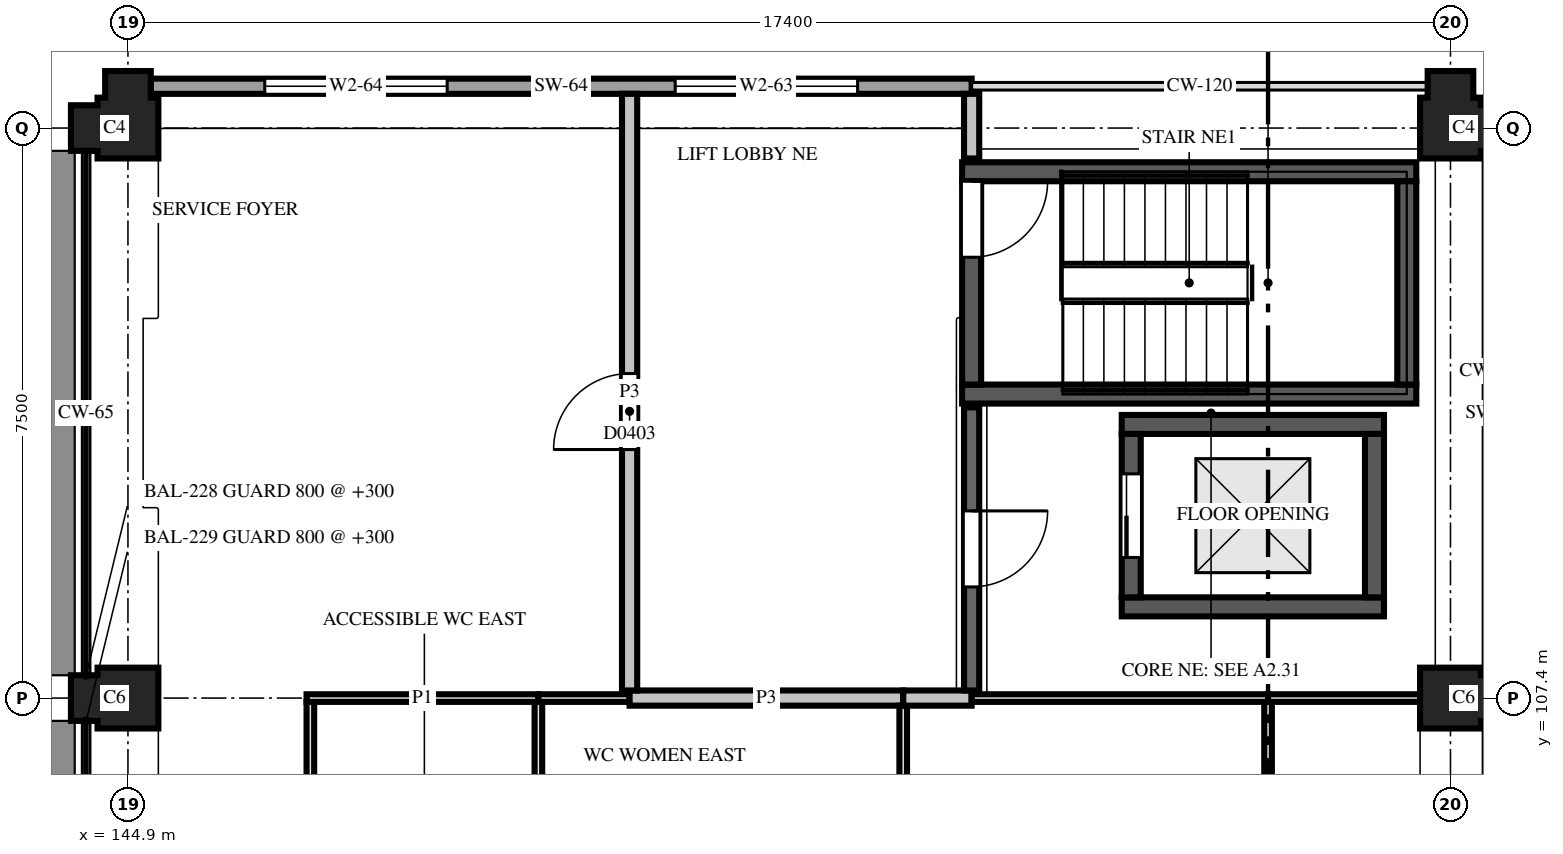
"""IFC4 building model, lengths in metres.
Left out: names, types, materials, properties, quantities, classifications, styles, units other than length and angle.
Written with IfcOpenShell. Run it as: python <this file> out.ifc"""

import sys

from ifc_helpers import new_model, si_unit, direction, frame, frame_2d, origin, place, context, subcontext, project, spatial, polyline, rectangle, outline, extrude, element, fill, save


model = new_model("IFC4")
c1 = context("Model", 3, precision=1e-05, world=origin(), true_north=direction((0.0, 1.0)))
c2 = subcontext(c1, "Body", "Model", "MODEL_VIEW")
j1 = project(units=[si_unit("LENGTHUNIT", "METRE"), si_unit("PLANEANGLEUNIT", "RADIAN")], contexts=[c1])
p1 = place(None, origin())
s1 = spatial("IfcSite", under=j1, at=p1, CompositionType="ELEMENT")
p2 = place(p1, origin())
s2 = spatial("IfcBuilding", under=s1, at=p2, CompositionType="ELEMENT")
p3 = place(p2, frame((0.0, 0.0, 15.6)))
s3 = spatial("IfcBuildingStorey", under=s2, at=p3, CompositionType="ELEMENT", Elevation=15.6)
for number, where, z_axis, x_axis in (
    (1, (144.9, 107.4, 0.0), (0.0, 0.0, 1.0), (-1.0, 0.0, 0.0)),
    (2, (162.3, 107.4, 0.0), (0.0, 0.0, 1.0), (1.0, 0.0, 0.0)),
):
    element("IfcColumn", number, at=place(p3, frame(where, z_axis=z_axis, x_axis=x_axis)), inside=s3, PredefinedType="COLUMN", context=c2, shape_type="SweptSolid", body=[
        extrude(outline(polyline([(-0.4, -0.4), (0.4, -0.4), (0.4, -0.3), (0.75, -0.3), (0.75, 0.3), (0.4, 0.3), (0.4, 0.4), (-0.4, 0.4), (-0.4, -0.4)])), origin(), (0.0, 0.0, 1.0), 3.7),
    ])
for number, where, z_axis, x_axis in (
    (3, (144.9, 114.9, 0.0), (0.0, 0.0, 1.0), (0.0, 1.0, 0.0)),
    (4, (162.3, 114.9, 0.0), (0.0, 0.0, 1.0), (1.0, 0.0, 0.0)),
):
    element("IfcColumn", number, at=place(p3, frame(where, z_axis=z_axis, x_axis=x_axis)), inside=s3, PredefinedType="COLUMN", context=c2, shape_type="SweptSolid", body=[
        extrude(outline(polyline([(-0.4, -0.4), (0.4, -0.4), (0.4, -0.3), (0.75, -0.3), (0.75, 0.3), (0.4, 0.3), (0.4, 0.4), (0.3, 0.4), (0.3, 0.75), (-0.3, 0.75), (-0.3, 0.4), (-0.4, 0.4), (-0.4, -0.4)])), origin(), (0.0, 0.0, 1.0), 3.7),
    ])
for number, where, z_axis, x_axis in (
    (5, (157.975, 108.6, 0.0), (0.0, 0.0, 1.0), (1.0, 0.0, 0.0)),
    (6, (157.975, 111.0, 0.0), (0.0, 0.0, 1.0), (1.0, 0.0, 0.0)),
):
    element("IfcWall", number, at=place(p3, frame(where, z_axis=z_axis, x_axis=x_axis)), inside=s3, PredefinedType="SHEAR", context=c2, shape_type="SweptSolid", body=[
        extrude(rectangle(XDim=3.45, YDim=0.25, at=frame_2d((1.725, 0.0))), origin(), (0.0, 0.0, 1.0), 3.7),
    ])
for number, where, z_axis, x_axis in (
    (7, (155.875, 111.4, 0.0), (0.0, 0.0, 1.0), (1.0, 0.0, 0.0)),
    (8, (155.875, 114.325, 0.0), (0.0, 0.0, 1.0), (1.0, 0.0, 0.0)),
):
    element("IfcWall", number, at=place(p3, frame(where, z_axis=z_axis, x_axis=x_axis)), inside=s3, PredefinedType="SHEAR", context=c2, shape_type="SweptSolid", body=[
        extrude(rectangle(XDim=5.975, YDim=0.25, at=frame_2d((2.988, 0.0))), origin(), (0.0, 0.0, 1.0), 3.7),
    ])
p4 = place(p3, frame((156.0, 111.525, 0.0), z_axis=(0.0, 0.0, 1.0), x_axis=(0.0, 1.0, 0.0)))
e9 = element("IfcWall", 9, at=p4, inside=s3, PredefinedType="SHEAR", context=c2, shape_type="SweptSolid", body=[
    extrude(rectangle(XDim=2.675, YDim=0.25, at=frame_2d((1.337, 0.0))), origin(), (0.0, 0.0, 1.0), 3.7),
])
p5 = place(p4, frame((1.675, 0.0, 0.0)))
e10 = element("IfcOpeningElement", 10, at=p5, cuts=e9, PredefinedType="OPENING", context=c2, shape_type="SweptSolid", body=[
    extrude(rectangle(XDim=1.0, YDim=2.1, at=frame_2d((0.5, 1.05))), frame((0.0, 0.135, 0.0), z_axis=(0.0, -1.0, 0.0), x_axis=(1.0, 0.0, 0.0)), (0.0, 0.0, 1.0), 0.27),
])
p6 = place(p3, frame((158.1, 108.725, 0.0), z_axis=(0.0, 0.0, 1.0), x_axis=(0.0, 1.0, 0.0)))
e11 = element("IfcWall", 11, at=p6, inside=s3, PredefinedType="SHEAR", context=c2, shape_type="SweptSolid", body=[
    extrude(rectangle(XDim=2.15, YDim=0.25, at=frame_2d((1.075, 0.0))), origin(), (0.0, 0.0, 1.0), 3.7),
])
p7 = place(p6, frame((0.525, 0.0, 0.0)))
e12 = element("IfcOpeningElement", 12, at=p7, cuts=e11, PredefinedType="OPENING", context=c2, shape_type="SweptSolid", body=[
    extrude(rectangle(XDim=1.1, YDim=2.1, at=frame_2d((0.55, 1.05))), frame((0.0, 0.135, 0.0), z_axis=(0.0, -1.0, 0.0), x_axis=(1.0, 0.0, 0.0)), (0.0, 0.0, 1.0), 0.27),
])
p8 = place(p3, frame((161.3, 108.725, 0.0), z_axis=(0.0, 0.0, 1.0), x_axis=(0.0, 1.0, 0.0)))
e13 = element("IfcWall", 13, at=p8, inside=s3, PredefinedType="SHEAR", context=c2, shape_type="SweptSolid", body=[
    extrude(rectangle(XDim=2.15, YDim=0.25, at=frame_2d((1.075, 0.0))), origin(), (0.0, 0.0, 1.0), 3.7),
])
p9 = place(p3, frame((161.725, 111.525, 0.0), z_axis=(0.0, 0.0, 1.0), x_axis=(0.0, 1.0, 0.0)))
e14 = element("IfcWall", 14, at=p9, inside=s3, PredefinedType="SHEAR", context=c2, shape_type="SweptSolid", body=[
    extrude(rectangle(XDim=2.675, YDim=0.25, at=frame_2d((1.337, 0.0))), origin(), (0.0, 0.0, 1.0), 3.7),
])
p10 = place(p3, frame((156.0, 115.45, 0.0), z_axis=(0.0, 0.0, 1.0), x_axis=(-1.0, 0.0, 0.0)))
e15 = element("IfcWall", 15, at=p10, inside=s3, PredefinedType="SOLIDWALL", context=c2, shape_type="SweptSolid", body=[
    extrude(rectangle(XDim=10.8, YDim=0.2, at=frame_2d((5.4, 0.0))), origin(), (0.0, 0.0, 1.0), 1.7),
])
p11 = place(p10, frame((1.5, 0.0, 0.55)))
e16 = element("IfcOpeningElement", 16, at=p11, cuts=e15, PredefinedType="OPENING", context=c2, shape_type="SweptSolid", body=[
    extrude(rectangle(XDim=2.4, YDim=1.0, at=frame_2d((1.2, 0.5))), frame((0.0, 0.11, 0.0), z_axis=(0.0, -1.0, 0.0), x_axis=(1.0, 0.0, 0.0)), (0.0, 0.0, 1.0), 0.22),
])
p12 = place(p10, frame((6.9, 0.0, 0.55)))
e17 = element("IfcOpeningElement", 17, at=p12, cuts=e15, PredefinedType="OPENING", context=c2, shape_type="SweptSolid", body=[
    extrude(rectangle(XDim=2.4, YDim=1.0, at=frame_2d((1.2, 0.5))), frame((0.0, 0.11, 0.0), z_axis=(0.0, -1.0, 0.0), x_axis=(1.0, 0.0, 0.0)), (0.0, 0.0, 1.0), 0.22),
])
for number, where, z_axis, x_axis in (
    (18, (147.3, 107.35, 0.0), (0.0, 0.0, 1.0), (0.0, -1.0, 0.0)),
    (19, (150.3, 107.35, 0.0), (0.0, 0.0, 1.0), (0.0, -1.0, 0.0)),
):
    element("IfcWall", number, at=place(p3, frame(where, z_axis=z_axis, x_axis=x_axis)), inside=s3, PredefinedType="PARTITIONING", context=c2, shape_type="SweptSolid", body=[
        extrude(rectangle(XDim=5.0, YDim=0.1, at=frame_2d((2.5, 0.0))), origin(), (0.0, 0.0, 1.0), 2.88),
    ])
p13 = place(p3, frame((150.3, 107.4, 0.0), z_axis=(0.0, 0.0, 1.0), x_axis=(-1.0, 0.0, 0.0)))
e20 = element("IfcWall", 20, at=p13, inside=s3, PredefinedType="PARTITIONING", context=c2, shape_type="SweptSolid", body=[
    extrude(rectangle(XDim=3.05, YDim=0.1, at=frame_2d((1.525, 0.0))), origin(), (0.0, 0.0, 1.0), 2.88),
])
p14 = place(p3, frame((151.5, 107.4, 0.0), z_axis=(0.0, 0.0, 1.0), x_axis=(-1.0, 0.0, 0.0)))
e21 = element("IfcWall", 21, at=p14, inside=s3, PredefinedType="PARTITIONING", context=c2, shape_type="SweptSolid", body=[
    extrude(rectangle(XDim=1.2, YDim=0.1, at=frame_2d((0.6, 0.0))), origin(), (0.0, 0.0, 1.0), 2.88),
])
p15 = place(p3, frame((151.5, 107.4, 0.0), z_axis=(0.0, 0.0, 1.0), x_axis=(1.0, 0.0, 0.0)))
e22 = element("IfcWall", 22, at=p15, inside=s3, PredefinedType="PARTITIONING", context=c2, shape_type="SweptSolid", body=[
    extrude(rectangle(XDim=3.6, YDim=0.2, at=frame_2d((1.8, 0.0))), origin(), (0.0, 0.0, 1.0), 2.88),
])
p16 = place(p3, frame((155.1, 107.3, 0.0), z_axis=(0.0, 0.0, 1.0), x_axis=(0.0, -1.0, 0.0)))
e23 = element("IfcWall", 23, at=p16, inside=s3, PredefinedType="PARTITIONING", context=c2, shape_type="SweptSolid", body=[
    extrude(rectangle(XDim=4.95, YDim=0.1, at=frame_2d((2.475, 0.0))), origin(), (0.0, 0.0, 1.0), 2.88),
])
p17 = place(p3, frame((155.1, 107.4, 0.0), z_axis=(0.0, 0.0, 1.0), x_axis=(1.0, 0.0, 0.0)))
e24 = element("IfcWall", 24, at=p17, inside=s3, PredefinedType="PARTITIONING", context=c2, shape_type="SweptSolid", body=[
    extrude(rectangle(XDim=0.9, YDim=0.2, at=frame_2d((0.45, 0.0))), origin(), (0.0, 0.0, 1.0), 2.88),
])
p18 = place(p3, frame((156.0, 107.5, 0.0), z_axis=(0.0, 0.0, 1.0), x_axis=(0.0, 1.0, 0.0)))
e25 = element("IfcWall", 25, at=p18, inside=s3, PredefinedType="PARTITIONING", context=c2, shape_type="SweptSolid", body=[
    extrude(rectangle(XDim=3.725, YDim=0.2, at=frame_2d((1.863, 0.0))), origin(), (0.0, 0.0, 1.0), 2.88),
])
p19 = place(p18, frame((1.363, 0.0, 0.0)))
e26 = element("IfcOpeningElement", 26, at=p19, cuts=e25, PredefinedType="OPENING", context=c2, shape_type="SweptSolid", body=[
    extrude(rectangle(XDim=1.0, YDim=2.1, at=frame_2d((0.5, 1.05))), frame((0.0, 0.11, 0.0), z_axis=(0.0, -1.0, 0.0), x_axis=(1.0, 0.0, 0.0)), (0.0, 0.0, 1.0), 0.22),
])
p20 = place(p3, frame((159.9, 107.35, 0.0), z_axis=(0.0, 0.0, 1.0), x_axis=(0.0, -1.0, 0.0)))
e27 = element("IfcWall", 27, at=p20, inside=s3, PredefinedType="PARTITIONING", context=c2, shape_type="SweptSolid", body=[
    extrude(rectangle(XDim=4.975, YDim=0.1, at=frame_2d((2.488, 0.0))), origin(), (0.0, 0.0, 1.0), 2.88),
])
p21 = place(p3, frame((159.9, 107.4, 0.0), z_axis=(0.0, 0.0, 1.0), x_axis=(-1.0, 0.0, 0.0)))
e28 = element("IfcWall", 28, at=p21, inside=s3, PredefinedType="PARTITIONING", context=c2, shape_type="SweptSolid", body=[
    extrude(rectangle(XDim=3.9, YDim=0.1, at=frame_2d((1.95, 0.0))), origin(), (0.0, 0.0, 1.0), 2.88),
])
p22 = place(p3, frame((162.24, 107.4, 0.0), z_axis=(0.0, 0.0, 1.0), x_axis=(-1.0, 0.0, 0.0)))
e29 = element("IfcWall", 29, at=p22, inside=s3, PredefinedType="PARTITIONING", context=c2, shape_type="SweptSolid", body=[
    extrude(rectangle(XDim=2.34, YDim=0.1, at=frame_2d((1.17, 0.0))), origin(), (0.0, 0.0, 1.0), 2.88),
])
p23 = place(p3, frame((156.0, 114.5, 0.0), z_axis=(0.0, 0.0, 1.0), x_axis=(0.0, 1.0, 0.0)))
e30 = element("IfcWall", 30, at=p23, inside=s3, PredefinedType="PARTITIONING", context=c2, shape_type="SweptSolid", body=[
    extrude(rectangle(XDim=0.85, YDim=0.2, at=frame_2d((0.425, 0.0))), origin(), (0.0, 0.0, 1.0), 2.88),
])
p24 = place(p3, frame((151.5, 115.35, 0.0), z_axis=(0.0, 0.0, 1.0), x_axis=(0.0, -1.0, 0.0)))
e31 = element("IfcWall", 31, at=p24, inside=s3, PredefinedType="PARTITIONING", context=c2, shape_type="SweptSolid", body=[
    extrude(rectangle(XDim=7.85, YDim=0.2, at=frame_2d((3.925, 0.0))), origin(), (0.0, 0.0, 1.0), 2.88),
])
p25 = place(p24, frame((3.68, 0.0, 0.0)))
e32 = element("IfcOpeningElement", 32, at=p25, cuts=e31, PredefinedType="OPENING", context=c2, shape_type="SweptSolid", body=[
    extrude(rectangle(XDim=1.0, YDim=2.1, at=frame_2d((0.5, 1.05))), frame((0.0, 0.11, 0.0), z_axis=(0.0, -1.0, 0.0), x_axis=(1.0, 0.0, 0.0)), (0.0, 0.0, 1.0), 0.22),
])
p26 = place(p11, origin())
e33 = element("IfcWindow", 33, at=p26, inside=s3, PartitioningType="SINGLE_PANEL", PredefinedType="WINDOW", context=c2, shape_type="SweptSolid", body=[
    extrude(rectangle(XDim=2.4, YDim=1.0, at=frame_2d((1.2, 0.5))), frame((0.0, 0.03, 0.0), z_axis=(0.0, -1.0, 0.0), x_axis=(1.0, 0.0, 0.0)), (0.0, 0.0, 1.0), 0.06),
])
fill(e16, e33)
p27 = place(p12, origin())
e34 = element("IfcWindow", 34, at=p27, inside=s3, PartitioningType="SINGLE_PANEL", PredefinedType="WINDOW", context=c2, shape_type="SweptSolid", body=[
    extrude(rectangle(XDim=2.4, YDim=1.0, at=frame_2d((1.2, 0.5))), frame((0.0, 0.03, 0.0), z_axis=(0.0, -1.0, 0.0), x_axis=(1.0, 0.0, 0.0)), (0.0, 0.0, 1.0), 0.06),
])
fill(e17, e34)
p28 = place(p25, origin())
e35 = element("IfcDoor", 35, at=p28, inside=s3, OperationType="SINGLE_SWING_RIGHT", PredefinedType="DOOR", context=c2, shape_type="SweptSolid", body=[
    extrude(rectangle(XDim=1.0, YDim=2.1, at=frame_2d((0.5, 1.05))), frame((0.0, 0.025, 0.0), z_axis=(0.0, -1.0, 0.0), x_axis=(1.0, 0.0, 0.0)), (0.0, 0.0, 1.0), 0.05),
])
fill(e32, e35)
p29 = place(p7, origin())
e36 = element("IfcDoor", 36, at=p29, inside=s3, OperationType="SLIDING_TO_LEFT", PredefinedType="DOOR", context=c2, shape_type="SweptSolid", body=[
    extrude(rectangle(XDim=1.1, YDim=2.1, at=frame_2d((0.55, 1.05))), frame((0.0, 0.025, 0.0), z_axis=(0.0, -1.0, 0.0), x_axis=(1.0, 0.0, 0.0)), (0.0, 0.0, 1.0), 0.05),
])
fill(e12, e36)
p30 = place(p5, origin())
e37 = element("IfcDoor", 37, at=p30, inside=s3, OperationType="SINGLE_SWING_RIGHT", PredefinedType="DOOR", context=c2, shape_type="SweptSolid", body=[
    extrude(rectangle(XDim=1.0, YDim=2.1, at=frame_2d((0.5, 1.05))), frame((0.0, 0.025, 0.0), z_axis=(0.0, -1.0, 0.0), x_axis=(1.0, 0.0, 0.0)), (0.0, 0.0, 1.0), 0.05),
])
fill(e10, e37)
p31 = place(p19, origin())
e38 = element("IfcDoor", 38, at=p31, inside=s3, OperationType="SINGLE_SWING_RIGHT", PredefinedType="DOOR", context=c2, shape_type="SweptSolid", body=[
    extrude(rectangle(XDim=1.0, YDim=2.1, at=frame_2d((0.5, 1.05))), frame((0.0, 0.025, 0.0), z_axis=(0.0, -1.0, 0.0), x_axis=(1.0, 0.0, 0.0)), (0.0, 0.0, 1.0), 0.05),
])
fill(e26, e38)
save(model, sys.argv[1])
